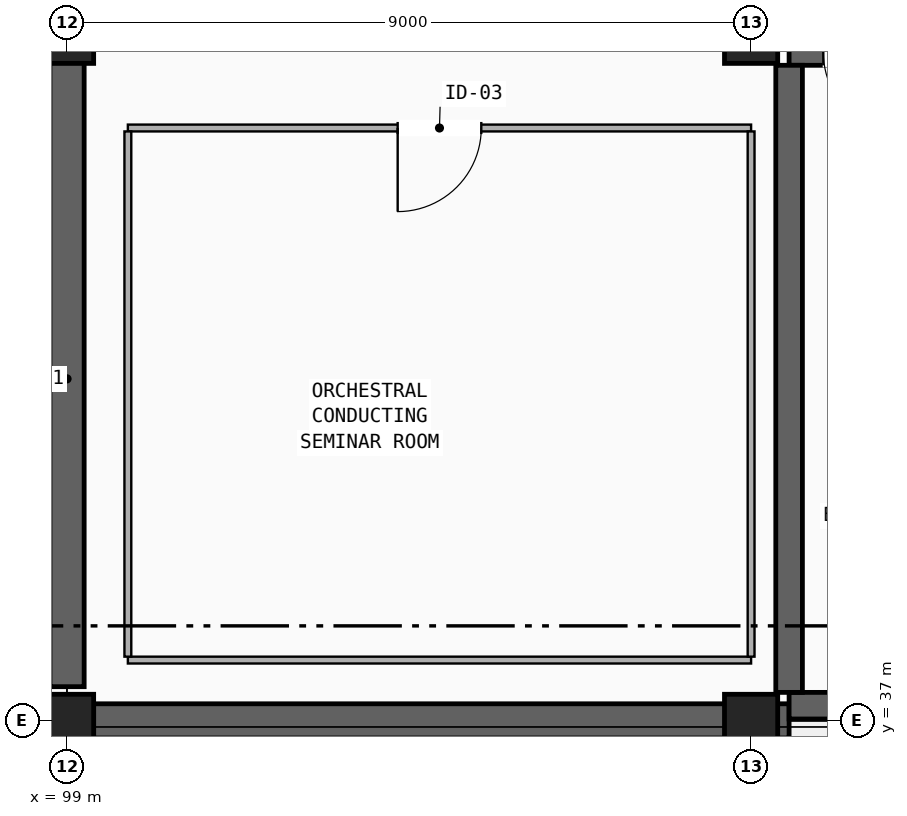
"""IFC4 building model, lengths in metres.
Left out: names, types, materials, properties, quantities, classifications, styles, units other than length and angle.
Written with IfcOpenShell. Run it as: python <this file> out.ifc"""

import sys

from ifc_helpers import new_model, si_unit, direction, frame, frame_2d, origin, origin_2d, place, context, subcontext, project, spatial, rectangle, extrude, element, fill, save


model = new_model("IFC4")
c1 = context("Model", 3, precision=1e-05, world=origin(), true_north=direction((0.0, 1.0)))
c2 = subcontext(c1, "Body", "Model", "MODEL_VIEW")
j1 = project(units=[si_unit("LENGTHUNIT", "METRE"), si_unit("PLANEANGLEUNIT", "RADIAN")], contexts=[c1])
p1 = place(None, origin())
s1 = spatial("IfcSite", under=j1, at=p1, CompositionType="ELEMENT")
p2 = place(p1, origin())
s2 = spatial("IfcBuilding", under=s1, at=p2, CompositionType="ELEMENT")
p3 = place(p2, frame((0.0, 0.0, 13.6)))
s3 = spatial("IfcBuildingStorey", under=s2, at=p3, CompositionType="ELEMENT", Elevation=13.6)
for number, where, z_axis, x_axis in (
    (1, (99.0, 37.0, 0.0), (0.0, 0.0, 1.0), (1.0, 0.0, 0.0)),
    (2, (99.0, 46.0, 0.0), (0.0, 0.0, 1.0), (1.0, 0.0, 0.0)),
    (3, (108.0, 37.0, 0.0), (0.0, 0.0, 1.0), (1.0, 0.0, 0.0)),
    (4, (108.0, 46.0, 0.0), (0.0, 0.0, 1.0), (1.0, 0.0, 0.0)),
):
    element("IfcColumn", number, at=place(p3, frame(where, z_axis=z_axis, x_axis=x_axis)), inside=s3, PredefinedType="COLUMN", context=c2, shape_type="SweptSolid", body=[
        extrude(rectangle(XDim=0.7, YDim=0.7, at=origin_2d()), origin(), (0.0, 0.0, 1.0), 4.08),
    ])
p4 = place(p3, frame((99.0, 37.45, 0.0), z_axis=(0.0, 0.0, 1.0), x_axis=(0.0, 1.0, 0.0)))
e5 = element("IfcWall", 5, at=p4, inside=s3, PredefinedType="SHEAR", context=c2, shape_type="SweptSolid", body=[
    extrude(rectangle(XDim=10.75, YDim=0.45, at=frame_2d((5.375, 0.0))), origin(), (0.0, 0.0, 1.0), 4.08),
])
p5 = place(p3, frame((99.35, 37.0, 0.0), z_axis=(0.0, 0.0, 1.0), x_axis=(1.0, 0.0, 0.0)))
e6 = element("IfcWall", 6, at=p5, inside=s3, PredefinedType="SHEAR", context=c2, shape_type="SweptSolid", body=[
    extrude(rectangle(XDim=9.15, YDim=0.45, at=frame_2d((4.575, 0.0))), origin(), (0.0, 0.0, 1.0), 4.08),
])
p6 = place(p3, frame((108.5, 37.2, 0.0), z_axis=(0.0, 0.0, 1.0), x_axis=(1.0, 0.0, 0.0)))
e7 = element("IfcWall", 7, at=p6, inside=s3, PredefinedType="SHEAR", context=c2, shape_type="SweptSolid", body=[
    extrude(rectangle(XDim=10.3, YDim=0.35, at=frame_2d((5.15, 0.0))), origin(), (0.0, 0.0, 1.0), 4.08),
])
p7 = place(p3, frame((108.5, 45.8, 0.0), z_axis=(0.0, 0.0, 1.0), x_axis=(1.0, 0.0, 0.0)))
e8 = element("IfcWall", 8, at=p7, inside=s3, PredefinedType="SHEAR", context=c2, shape_type="SweptSolid", body=[
    extrude(rectangle(XDim=10.3, YDim=0.35, at=frame_2d((5.15, 0.0))), origin(), (0.0, 0.0, 1.0), 4.08),
])
p8 = place(p7, frame((0.45, 0.0, 0.0)))
e9 = element("IfcOpeningElement", 9, at=p8, cuts=e8, PredefinedType="OPENING", context=c2, shape_type="SweptSolid", body=[
    extrude(rectangle(XDim=1.1, YDim=2.2, at=frame_2d((0.55, 1.1))), frame((0.0, 0.185, 0.0), z_axis=(0.0, -1.0, 0.0), x_axis=(1.0, 0.0, 0.0)), (0.0, 0.0, 1.0), 0.37),
])
p9 = place(p7, frame((4.475, 0.0, 0.0)))
e10 = element("IfcOpeningElement", 10, at=p9, cuts=e8, PredefinedType="OPENING", context=c2, shape_type="SweptSolid", body=[
    extrude(rectangle(XDim=1.65, YDim=2.34, at=frame_2d((0.825, 1.17))), frame((0.0, 0.185, 0.0), z_axis=(0.0, -1.0, 0.0), x_axis=(1.0, 0.0, 0.0)), (0.0, 0.0, 1.0), 0.37),
])
p10 = place(p3, frame((108.5, 37.375, 0.0), z_axis=(0.0, 0.0, 1.0), x_axis=(0.0, 1.0, 0.0)))
e11 = element("IfcWall", 11, at=p10, inside=s3, PredefinedType="SHEAR", context=c2, shape_type="SweptSolid", body=[
    extrude(rectangle(XDim=8.25, YDim=0.35, at=frame_2d((4.125, 0.0))), origin(), (0.0, 0.0, 1.0), 4.08),
])
p11 = place(p3, frame((99.8, 37.8, 0.0), z_axis=(0.0, 0.0, 1.0), x_axis=(1.0, 0.0, 0.0)))
e12 = element("IfcWall", 12, at=p11, inside=s3, PredefinedType="PARTITIONING", context=c2, shape_type="SweptSolid", body=[
    extrude(rectangle(XDim=8.2, YDim=0.09, at=frame_2d((4.1, 0.0))), origin(), (0.0, 0.0, 1.0), 3.14),
])
p12 = place(p3, frame((99.8, 44.8, 0.0), z_axis=(0.0, 0.0, 1.0), x_axis=(1.0, 0.0, 0.0)))
e13 = element("IfcWall", 13, at=p12, inside=s3, PredefinedType="PARTITIONING", context=c2, shape_type="SweptSolid", body=[
    extrude(rectangle(XDim=8.2, YDim=0.09, at=frame_2d((4.1, 0.0))), origin(), (0.0, 0.0, 1.0), 3.14),
])
p13 = place(p12, frame((3.55, 0.0, 0.0)))
e14 = element("IfcOpeningElement", 14, at=p13, cuts=e13, PredefinedType="OPENING", context=c2, shape_type="SweptSolid", body=[
    extrude(rectangle(XDim=1.1, YDim=2.2, at=frame_2d((0.55, 1.1))), frame((0.0, 0.055, 0.0), z_axis=(0.0, -1.0, 0.0), x_axis=(1.0, 0.0, 0.0)), (0.0, 0.0, 1.0), 0.11),
])
p14 = place(p3, frame((99.8, 37.845, 0.0), z_axis=(0.0, 0.0, 1.0), x_axis=(0.0, 1.0, 0.0)))
e15 = element("IfcWall", 15, at=p14, inside=s3, PredefinedType="PARTITIONING", context=c2, shape_type="SweptSolid", body=[
    extrude(rectangle(XDim=6.91, YDim=0.09, at=frame_2d((3.455, 0.0))), origin(), (0.0, 0.0, 1.0), 3.287),
])
p15 = place(p3, frame((108.0, 37.845, 0.0), z_axis=(0.0, 0.0, 1.0), x_axis=(0.0, 1.0, 0.0)))
e16 = element("IfcWall", 16, at=p15, inside=s3, PredefinedType="PARTITIONING", context=c2, shape_type="SweptSolid", body=[
    extrude(rectangle(XDim=6.91, YDim=0.09, at=frame_2d((3.455, 0.0))), origin(), (0.0, 0.0, 1.0), 3.14),
])
p16 = place(p8, frame((1.1, 0.0, 0.0), z_axis=(0.0, 0.0, 1.0), x_axis=(-1.0, 0.0, 0.0)))
e17 = element("IfcDoor", 17, at=p16, inside=s3, OperationType="SINGLE_SWING_LEFT", PredefinedType="DOOR", context=c2, shape_type="SweptSolid", body=[
    extrude(rectangle(XDim=1.1, YDim=2.2, at=frame_2d((0.55, 1.1))), frame((0.0, 0.025, 0.0), z_axis=(0.0, -1.0, 0.0), x_axis=(1.0, 0.0, 0.0)), (0.0, 0.0, 1.0), 0.05),
])
fill(e9, e17)
p17 = place(p13, frame((1.1, 0.0, 0.0), z_axis=(0.0, 0.0, 1.0), x_axis=(-1.0, 0.0, 0.0)))
e18 = element("IfcDoor", 18, at=p17, inside=s3, OperationType="SINGLE_SWING_RIGHT", PredefinedType="DOOR", context=c2, shape_type="SweptSolid", body=[
    extrude(rectangle(XDim=1.1, YDim=2.2, at=frame_2d((0.55, 1.1))), frame((0.0, 0.025, 0.0), z_axis=(0.0, -1.0, 0.0), x_axis=(1.0, 0.0, 0.0)), (0.0, 0.0, 1.0), 0.05),
])
fill(e14, e18)
save(model, sys.argv[1])
